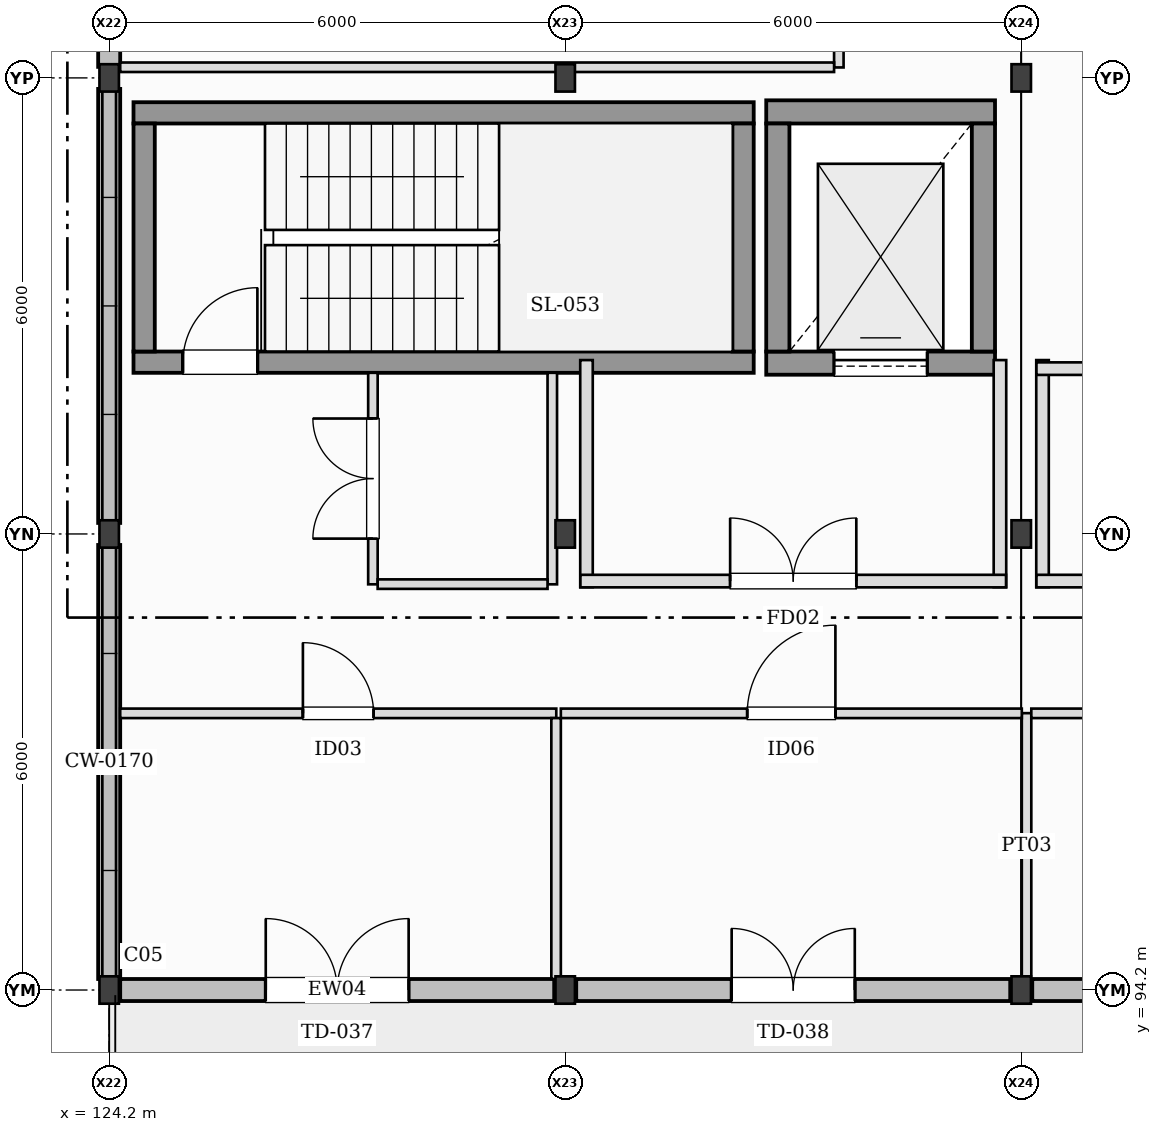
"""IFC4 building model, lengths in metres.
Left out: names, types, materials, properties, quantities, classifications, styles, units other than length and angle.
Written with IfcOpenShell. Run it as: python <this file> out.ifc"""

import sys

from ifc_helpers import new_model, si_unit, direction, frame, frame_2d, origin, origin_2d, place, context, subcontext, project, spatial, rectangle, i_section, extrude, element, fill, save


model = new_model("IFC4")
c1 = context("Model", 3, precision=1e-05, world=origin(), true_north=direction((0.0, 1.0)))
c2 = subcontext(c1, "Body", "Model", "MODEL_VIEW")
j1 = project(units=[si_unit("LENGTHUNIT", "METRE"), si_unit("PLANEANGLEUNIT", "RADIAN")], contexts=[c1])
p1 = place(None, origin())
s1 = spatial("IfcSite", under=j1, at=p1, CompositionType="ELEMENT")
p2 = place(p1, origin())
s2 = spatial("IfcBuilding", under=s1, at=p2, CompositionType="ELEMENT")
p3 = place(p2, frame((0.0, 0.0, 18.0)))
s3 = spatial("IfcBuildingStorey", under=s2, at=p3, CompositionType="ELEMENT", Elevation=18.0)
for number, where, z_axis, x_axis in (
    (1, (124.2, 94.2, 0.0), (0.0, 0.0, 1.0), (1.0, 0.0, 0.0)),
    (2, (124.2, 100.2, 0.0), (0.0, 0.0, 1.0), (1.0, 0.0, 0.0)),
    (3, (124.2, 106.2, 0.0), (0.0, 0.0, 1.0), (1.0, 0.0, 0.0)),
    (4, (130.2, 94.2, 0.0), (0.0, 0.0, 1.0), (1.0, 0.0, 0.0)),
    (5, (130.2, 100.2, 0.0), (0.0, 0.0, 1.0), (1.0, 0.0, 0.0)),
    (6, (130.2, 106.2, 0.0), (0.0, 0.0, 1.0), (1.0, 0.0, 0.0)),
    (7, (136.2, 94.2, 0.0), (0.0, 0.0, 1.0), (1.0, 0.0, 0.0)),
    (8, (136.2, 100.2, 0.0), (0.0, 0.0, 1.0), (1.0, 0.0, 0.0)),
    (9, (136.2, 106.2, 0.0), (0.0, 0.0, 1.0), (1.0, 0.0, 0.0)),
):
    element("IfcColumn", number, at=place(p3, frame(where, z_axis=z_axis, x_axis=x_axis)), inside=s3, PredefinedType="COLUMN", context=c2, shape_type="SweptSolid", body=[
        extrude(i_section(OverallWidth=0.256, OverallDepth=0.36, WebThickness=0.011, FlangeThickness=0.02, at=origin_2d()), origin(), (0.0, 0.0, 1.0), 3.6),
    ])
p4 = place(p3, frame((124.345, 94.2, 0.0), z_axis=(0.0, 0.0, 1.0), x_axis=(1.0, 0.0, 0.0)))
e10 = element("IfcWall", 10, at=p4, inside=s3, PredefinedType="STANDARD", context=c2, shape_type="SweptSolid", body=[
    extrude(rectangle(XDim=5.71, YDim=0.29, at=frame_2d((2.855, 0.0))), origin(), (0.0, 0.0, 1.0), 3.6),
])
p5 = place(p4, frame((1.915, 0.0, 0.0)))
e11 = element("IfcOpeningElement", 11, at=p5, cuts=e10, PredefinedType="OPENING", context=c2, shape_type="SweptSolid", body=[
    extrude(rectangle(XDim=1.88, YDim=2.28, at=frame_2d((0.94, 1.14))), frame((0.0, 0.155, 0.0), z_axis=(0.0, -1.0, 0.0), x_axis=(1.0, 0.0, 0.0)), (0.0, 0.0, 1.0), 0.31),
])
p6 = place(p3, frame((130.345, 94.2, 0.0), z_axis=(0.0, 0.0, 1.0), x_axis=(1.0, 0.0, 0.0)))
e12 = element("IfcWall", 12, at=p6, inside=s3, PredefinedType="STANDARD", context=c2, shape_type="SweptSolid", body=[
    extrude(rectangle(XDim=5.71, YDim=0.29, at=frame_2d((2.855, 0.0))), origin(), (0.0, 0.0, 1.0), 3.6),
])
p7 = place(p6, frame((2.045, 0.0, 0.0)))
e13 = element("IfcOpeningElement", 13, at=p7, cuts=e12, PredefinedType="OPENING", context=c2, shape_type="SweptSolid", body=[
    extrude(rectangle(XDim=1.62, YDim=2.2, at=frame_2d((0.81, 1.1))), frame((0.0, 0.155, 0.0), z_axis=(0.0, -1.0, 0.0), x_axis=(1.0, 0.0, 0.0)), (0.0, 0.0, 1.0), 0.31),
])
p8 = place(p3, frame((136.345, 94.2, 0.0), z_axis=(0.0, 0.0, 1.0), x_axis=(1.0, 0.0, 0.0)))
e14 = element("IfcWall", 14, at=p8, inside=s3, PredefinedType="STANDARD", context=c2, shape_type="SweptSolid", body=[
    extrude(rectangle(XDim=5.71, YDim=0.29, at=frame_2d((2.855, 0.0))), origin(), (0.0, 0.0, 1.0), 3.6),
])
p9 = place(p8, frame((2.335, 0.0, 0.0)))
e15 = element("IfcOpeningElement", 15, at=p9, cuts=e14, PredefinedType="OPENING", context=c2, shape_type="SweptSolid", body=[
    extrude(rectangle(XDim=1.04, YDim=2.16, at=frame_2d((0.52, 1.08))), frame((0.0, 0.155, 0.0), z_axis=(0.0, -1.0, 0.0), x_axis=(1.0, 0.0, 0.0)), (0.0, 0.0, 1.0), 0.31),
])
p10 = place(p3, frame((124.2, 100.055, 0.0), z_axis=(0.0, 0.0, 1.0), x_axis=(0.0, -1.0, 0.0)))
e16 = element("IfcWall", 16, at=p10, inside=s3, PredefinedType="STANDARD", context=c2, shape_type="SweptSolid", body=[
    extrude(rectangle(XDim=5.71, YDim=0.29, at=frame_2d((2.855, 0.0))), origin(), (0.0, 0.0, 1.0), 0.92),
])
p11 = place(p3, frame((124.2, 106.055, 0.0), z_axis=(0.0, 0.0, 1.0), x_axis=(0.0, -1.0, 0.0)))
e17 = element("IfcWall", 17, at=p11, inside=s3, PredefinedType="STANDARD", context=c2, shape_type="SweptSolid", body=[
    extrude(rectangle(XDim=5.71, YDim=0.29, at=frame_2d((2.855, 0.0))), origin(), (0.0, 0.0, 1.0), 0.32),
])
p12 = place(p3, frame((124.2, 112.055, 0.0), z_axis=(0.0, 0.0, 1.0), x_axis=(0.0, -1.0, 0.0)))
e18 = element("IfcWall", 18, at=p12, inside=s3, PredefinedType="STANDARD", context=c2, shape_type="SweptSolid", body=[
    extrude(rectangle(XDim=5.71, YDim=0.29, at=frame_2d((2.855, 0.0))), origin(), (0.0, 0.0, 1.0), 3.6),
])
p13 = place(p12, frame((1.83, 0.0, 0.85)))
e19 = element("IfcOpeningElement", 19, at=p13, cuts=e18, PredefinedType="OPENING", context=c2, shape_type="SweptSolid", body=[
    extrude(rectangle(XDim=2.05, YDim=1.75, at=frame_2d((1.025, 0.875))), frame((0.0, 0.155, 0.0), z_axis=(0.0, -1.0, 0.0), x_axis=(1.0, 0.0, 0.0)), (0.0, 0.0, 1.0), 0.31),
])
p14 = place(p3, frame((124.52, 102.46, 0.0), z_axis=(0.0, 0.0, 1.0), x_axis=(1.0, 0.0, 0.0)))
e20 = element("IfcWall", 20, at=p14, inside=s3, PredefinedType="SHEAR", context=c2, shape_type="SweptSolid", body=[
    extrude(rectangle(XDim=8.16, YDim=0.28, at=frame_2d((4.08, 0.0))), origin(), (0.0, 0.0, 1.0), 3.45),
])
p15 = place(p14, frame((0.65, 0.0, 0.0)))
e21 = element("IfcOpeningElement", 21, at=p15, cuts=e20, PredefinedType="OPENING", context=c2, shape_type="SweptSolid", body=[
    extrude(rectangle(XDim=0.98, YDim=2.15, at=frame_2d((0.49, 1.075))), frame((0.0, 0.15, 0.0), z_axis=(0.0, -1.0, 0.0), x_axis=(1.0, 0.0, 0.0)), (0.0, 0.0, 1.0), 0.3),
])
p16 = place(p3, frame((132.68, 105.74, 0.0), z_axis=(0.0, 0.0, 1.0), x_axis=(-1.0, 0.0, 0.0)))
e22 = element("IfcWall", 22, at=p16, inside=s3, PredefinedType="SHEAR", context=c2, shape_type="SweptSolid", body=[
    extrude(rectangle(XDim=8.16, YDim=0.28, at=frame_2d((4.08, 0.0))), origin(), (0.0, 0.0, 1.0), 3.45),
])
for number, where, z_axis, x_axis in (
    (23, (124.66, 105.6, 0.0), (0.0, 0.0, 1.0), (0.0, -1.0, 0.0)),
    (24, (132.54, 102.6, 0.0), (0.0, 0.0, 1.0), (0.0, 1.0, 0.0)),
):
    element("IfcWall", number, at=place(p3, frame(where, z_axis=z_axis, x_axis=x_axis)), inside=s3, PredefinedType="SHEAR", context=c2, shape_type="SweptSolid", body=[
        extrude(rectangle(XDim=3.0, YDim=0.28, at=frame_2d((1.5, 0.0))), origin(), (0.0, 0.0, 1.0), 3.45),
    ])
p17 = place(p3, frame((132.845, 102.448, 0.0), z_axis=(0.0, 0.0, 1.0), x_axis=(1.0, 0.0, 0.0)))
e25 = element("IfcWall", 25, at=p17, inside=s3, PredefinedType="SHEAR", context=c2, shape_type="SweptSolid", body=[
    extrude(rectangle(XDim=3.01, YDim=0.305, at=frame_2d((1.505, 0.0))), origin(), (0.0, 0.0, 1.0), 3.45),
])
p18 = place(p17, frame((0.895, 0.0, 0.0)))
e26 = element("IfcOpeningElement", 26, at=p18, cuts=e25, PredefinedType="OPENING", context=c2, shape_type="SweptSolid", body=[
    extrude(rectangle(XDim=1.22, YDim=2.22, at=frame_2d((0.61, 1.11))), frame((0.0, 0.162, 0.0), z_axis=(0.0, -1.0, 0.0), x_axis=(1.0, 0.0, 0.0)), (0.0, 0.0, 1.0), 0.325),
])
p19 = place(p3, frame((135.855, 105.752, 0.0), z_axis=(0.0, 0.0, 1.0), x_axis=(-1.0, 0.0, 0.0)))
e27 = element("IfcWall", 27, at=p19, inside=s3, PredefinedType="SHEAR", context=c2, shape_type="SweptSolid", body=[
    extrude(rectangle(XDim=3.01, YDim=0.305, at=frame_2d((1.505, 0.0))), origin(), (0.0, 0.0, 1.0), 3.45),
])
for number, where, z_axis, x_axis in (
    (28, (132.998, 105.6, 0.0), (0.0, 0.0, 1.0), (0.0, -1.0, 0.0)),
    (29, (135.702, 102.6, 0.0), (0.0, 0.0, 1.0), (0.0, 1.0, 0.0)),
):
    element("IfcWall", number, at=place(p3, frame(where, z_axis=z_axis, x_axis=x_axis)), inside=s3, PredefinedType="SHEAR", context=c2, shape_type="SweptSolid", body=[
        extrude(rectangle(XDim=3.0, YDim=0.305, at=frame_2d((1.5, 0.0))), origin(), (0.0, 0.0, 1.0), 3.45),
    ])
for number, where, z_axis, x_axis in (
    (30, (130.48, 99.5, 0.0), (0.0, 0.0, 1.0), (0.0, 1.0, 0.0)),
    (31, (135.92, 102.488, 0.0), (0.0, 0.0, 1.0), (0.0, -1.0, 0.0)),
):
    element("IfcWall", number, at=place(p3, frame(where, z_axis=z_axis, x_axis=x_axis)), inside=s3, PredefinedType="PARTITIONING", context=c2, shape_type="SweptSolid", body=[
        extrude(rectangle(XDim=2.988, YDim=0.165, at=frame_2d((1.494, 0.0))), origin(), (0.0, 0.0, 1.0), 3.36),
    ])
p20 = place(p3, frame((130.4, 99.58, 0.0), z_axis=(0.0, 0.0, 1.0), x_axis=(1.0, 0.0, 0.0)))
e32 = element("IfcWall", 32, at=p20, inside=s3, PredefinedType="PARTITIONING", context=c2, shape_type="SweptSolid", body=[
    extrude(rectangle(XDim=5.6, YDim=0.165, at=frame_2d((2.8, 0.0))), origin(), (0.0, 0.0, 1.0), 3.36),
])
p21 = place(p20, frame((1.97, 0.0, 0.0)))
e33 = element("IfcOpeningElement", 33, at=p21, cuts=e32, PredefinedType="OPENING", context=c2, shape_type="SweptSolid", body=[
    extrude(rectangle(XDim=1.66, YDim=2.2, at=frame_2d((0.83, 1.1))), frame((0.0, 0.093, 0.0), z_axis=(0.0, -1.0, 0.0), x_axis=(1.0, 0.0, 0.0)), (0.0, 0.0, 1.0), 0.185),
])
p22 = place(p3, frame((136.48, 99.5, 0.0), z_axis=(0.0, 0.0, 1.0), x_axis=(0.0, 1.0, 0.0)))
e34 = element("IfcWall", 34, at=p22, inside=s3, PredefinedType="PARTITIONING", context=c2, shape_type="SweptSolid", body=[
    extrude(rectangle(XDim=2.988, YDim=0.165, at=frame_2d((1.494, 0.0))), origin(), (0.0, 0.0, 1.0), 3.36),
])
p23 = place(p3, frame((136.4, 102.375, 0.0), z_axis=(0.0, 0.0, 1.0), x_axis=(1.0, 0.0, 0.0)))
e35 = element("IfcWall", 35, at=p23, inside=s3, PredefinedType="PARTITIONING", context=c2, shape_type="SweptSolid", body=[
    extrude(rectangle(XDim=1.365, YDim=0.165, at=frame_2d((0.683, 0.0))), origin(), (0.0, 0.0, 1.0), 3.36),
])
p24 = place(p3, frame((136.4, 99.58, 0.0), z_axis=(0.0, 0.0, 1.0), x_axis=(1.0, 0.0, 0.0)))
e36 = element("IfcWall", 36, at=p24, inside=s3, PredefinedType="PARTITIONING", context=c2, shape_type="SweptSolid", body=[
    extrude(rectangle(XDim=5.6, YDim=0.165, at=frame_2d((2.8, 0.0))), origin(), (0.0, 0.0, 1.0), 3.36),
])
p25 = place(p24, frame((1.97, 0.0, 0.0)))
e37 = element("IfcOpeningElement", 37, at=p25, cuts=e36, PredefinedType="OPENING", context=c2, shape_type="SweptSolid", body=[
    extrude(rectangle(XDim=1.66, YDim=2.2, at=frame_2d((0.83, 1.1))), frame((0.0, 0.093, 0.0), z_axis=(0.0, -1.0, 0.0), x_axis=(1.0, 0.0, 0.0)), (0.0, 0.0, 1.0), 0.185),
])
p26 = place(p3, frame((136.27, 94.345, 0.0), z_axis=(0.0, 0.0, 1.0), x_axis=(0.0, 1.0, 0.0)))
e38 = element("IfcWall", 38, at=p26, inside=s3, PredefinedType="PARTITIONING", context=c2, shape_type="SweptSolid", body=[
    extrude(rectangle(XDim=3.498, YDim=0.125, at=frame_2d((1.749, 0.0))), origin(), (0.0, 0.0, 1.0), 3.36),
])
p27 = place(p3, frame((136.333, 97.84, 0.0), z_axis=(0.0, 0.0, 1.0), x_axis=(1.0, 0.0, 0.0)))
e39 = element("IfcWall", 39, at=p27, inside=s3, PredefinedType="PARTITIONING", context=c2, shape_type="SweptSolid", body=[
    extrude(rectangle(XDim=17.722, YDim=0.125, at=frame_2d((8.861, 0.0))), origin(), (0.0, 0.0, 1.0), 3.36),
])
p28 = place(p27, frame((8.381, 0.0, 0.0)))
e40 = element("IfcOpeningElement", 40, at=p28, cuts=e39, PredefinedType="OPENING", context=c2, shape_type="SweptSolid", body=[
    extrude(rectangle(XDim=0.96, YDim=2.15, at=frame_2d((0.48, 1.075))), frame((0.0, 0.073, 0.0), z_axis=(0.0, -1.0, 0.0), x_axis=(1.0, 0.0, 0.0)), (0.0, 0.0, 1.0), 0.145),
])
p29 = place(p3, frame((124.345, 97.84, 0.0), z_axis=(0.0, 0.0, 1.0), x_axis=(1.0, 0.0, 0.0)))
e41 = element("IfcWall", 41, at=p29, inside=s3, PredefinedType="PARTITIONING", context=c2, shape_type="SweptSolid", body=[
    extrude(rectangle(XDim=5.738, YDim=0.125, at=frame_2d((2.869, 0.0))), origin(), (0.0, 0.0, 1.0), 3.36),
])
p30 = place(p29, frame((2.404, 0.0, 0.0)))
e42 = element("IfcOpeningElement", 42, at=p30, cuts=e41, PredefinedType="OPENING", context=c2, shape_type="SweptSolid", body=[
    extrude(rectangle(XDim=0.93, YDim=2.1, at=frame_2d((0.465, 1.05))), frame((0.0, 0.073, 0.0), z_axis=(0.0, -1.0, 0.0), x_axis=(1.0, 0.0, 0.0)), (0.0, 0.0, 1.0), 0.145),
])
p31 = place(p3, frame((130.08, 97.778, 0.0), z_axis=(0.0, 0.0, 1.0), x_axis=(0.0, -1.0, 0.0)))
e43 = element("IfcWall", 43, at=p31, inside=s3, PredefinedType="PARTITIONING", context=c2, shape_type="SweptSolid", body=[
    extrude(rectangle(XDim=3.433, YDim=0.125, at=frame_2d((1.716, 0.0))), origin(), (0.0, 0.0, 1.0), 3.36),
])
p32 = place(p3, frame((130.143, 97.84, 0.0), z_axis=(0.0, 0.0, 1.0), x_axis=(1.0, 0.0, 0.0)))
e44 = element("IfcWall", 44, at=p32, inside=s3, PredefinedType="PARTITIONING", context=c2, shape_type="SweptSolid", body=[
    extrude(rectangle(XDim=6.065, YDim=0.125, at=frame_2d((3.032, 0.0))), origin(), (0.0, 0.0, 1.0), 3.36),
])
p33 = place(p32, frame((2.452, 0.0, 0.0)))
e45 = element("IfcOpeningElement", 45, at=p33, cuts=e44, PredefinedType="OPENING", context=c2, shape_type="SweptSolid", body=[
    extrude(rectangle(XDim=1.16, YDim=2.2, at=frame_2d((0.58, 1.1))), frame((0.0, 0.073, 0.0), z_axis=(0.0, -1.0, 0.0), x_axis=(1.0, 0.0, 0.0)), (0.0, 0.0, 1.0), 0.145),
])
p34 = place(p3, frame((133.8, 108.403, 0.0), z_axis=(0.0, 0.0, 1.0), x_axis=(0.0, -1.0, 0.0)))
e46 = element("IfcWall", 46, at=p34, inside=s3, PredefinedType="PARTITIONING", context=c2, shape_type="SweptSolid", body=[
    extrude(rectangle(XDim=2.065, YDim=0.125, at=frame_2d((1.033, 0.0))), origin(), (0.0, 0.0, 1.0), 3.36),
])
p35 = place(p3, frame((133.738, 106.34, 0.0), z_axis=(0.0, 0.0, 1.0), x_axis=(-1.0, 0.0, 0.0)))
e47 = element("IfcWall", 47, at=p35, inside=s3, PredefinedType="PARTITIONING", context=c2, shape_type="SweptSolid", body=[
    extrude(rectangle(XDim=9.393, YDim=0.125, at=frame_2d((4.696, 0.0))), origin(), (0.0, 0.0, 1.0), 3.36),
])
p36 = place(p3, frame((127.67, 99.538, 0.0), z_axis=(0.0, 0.0, 1.0), x_axis=(0.0, 1.0, 0.0)))
e48 = element("IfcWall", 48, at=p36, inside=s3, PredefinedType="PARTITIONING", context=c2, shape_type="SweptSolid", body=[
    extrude(rectangle(XDim=2.782, YDim=0.125, at=frame_2d((1.391, 0.0))), origin(), (0.0, 0.0, 1.0), 3.36),
])
p37 = place(p36, frame((0.601, 0.0, 0.0)))
e49 = element("IfcOpeningElement", 49, at=p37, cuts=e48, PredefinedType="OPENING", context=c2, shape_type="SweptSolid", body=[
    extrude(rectangle(XDim=1.58, YDim=2.2, at=frame_2d((0.79, 1.1))), frame((0.0, 0.073, 0.0), z_axis=(0.0, -1.0, 0.0), x_axis=(1.0, 0.0, 0.0)), (0.0, 0.0, 1.0), 0.145),
])
p38 = place(p3, frame((130.03, 102.32, 0.0), z_axis=(0.0, 0.0, 1.0), x_axis=(0.0, -1.0, 0.0)))
e50 = element("IfcWall", 50, at=p38, inside=s3, PredefinedType="PARTITIONING", context=c2, shape_type="SweptSolid", body=[
    extrude(rectangle(XDim=2.782, YDim=0.125, at=frame_2d((1.391, 0.0))), origin(), (0.0, 0.0, 1.0), 3.36),
])
p39 = place(p3, frame((129.968, 99.54, 0.0), z_axis=(0.0, 0.0, 1.0), x_axis=(-1.0, 0.0, 0.0)))
e51 = element("IfcWall", 51, at=p39, inside=s3, PredefinedType="PARTITIONING", context=c2, shape_type="SweptSolid", body=[
    extrude(rectangle(XDim=2.235, YDim=0.125, at=frame_2d((1.118, 0.0))), origin(), (0.0, 0.0, 1.0), 3.36),
])
p40 = place(p5, frame((1.88, 0.0, 0.0), z_axis=(0.0, 0.0, 1.0), x_axis=(-1.0, 0.0, 0.0)))
e52 = element("IfcDoor", 52, at=p40, inside=s3, OperationType="DOUBLE_DOOR_SINGLE_SWING", PredefinedType="DOOR", context=c2, shape_type="SweptSolid", body=[
    extrude(rectangle(XDim=1.88, YDim=2.28, at=frame_2d((0.94, 1.14))), frame((0.0, 0.025, 0.0), z_axis=(0.0, -1.0, 0.0), x_axis=(1.0, 0.0, 0.0)), (0.0, 0.0, 1.0), 0.05),
])
fill(e11, e52)
p41 = place(p7, frame((1.62, 0.0, 0.0), z_axis=(0.0, 0.0, 1.0), x_axis=(-1.0, 0.0, 0.0)))
e53 = element("IfcDoor", 53, at=p41, inside=s3, OperationType="DOUBLE_DOOR_SINGLE_SWING", PredefinedType="DOOR", context=c2, shape_type="SweptSolid", body=[
    extrude(rectangle(XDim=1.62, YDim=2.2, at=frame_2d((0.81, 1.1))), frame((0.0, 0.025, 0.0), z_axis=(0.0, -1.0, 0.0), x_axis=(1.0, 0.0, 0.0)), (0.0, 0.0, 1.0), 0.05),
])
fill(e13, e53)
p42 = place(p15, origin())
e54 = element("IfcDoor", 54, at=p42, inside=s3, OperationType="SINGLE_SWING_RIGHT", PredefinedType="DOOR", context=c2, shape_type="SweptSolid", body=[
    extrude(rectangle(XDim=0.98, YDim=2.15, at=frame_2d((0.49, 1.075))), frame((0.0, 0.025, 0.0), z_axis=(0.0, -1.0, 0.0), x_axis=(1.0, 0.0, 0.0)), (0.0, 0.0, 1.0), 0.05),
])
fill(e21, e54)
p43 = place(p18, origin())
e55 = element("IfcDoor", 55, at=p43, inside=s3, OperationType="SLIDING_TO_LEFT", PredefinedType="DOOR", context=c2, shape_type="SweptSolid", body=[
    extrude(rectangle(XDim=1.22, YDim=2.22, at=frame_2d((0.61, 1.11))), frame((0.0, 0.025, 0.0), z_axis=(0.0, -1.0, 0.0), x_axis=(1.0, 0.0, 0.0)), (0.0, 0.0, 1.0), 0.05),
])
fill(e26, e55)
p44 = place(p21, frame((1.66, 0.0, 0.0), z_axis=(0.0, 0.0, 1.0), x_axis=(-1.0, 0.0, 0.0)))
e56 = element("IfcDoor", 56, at=p44, inside=s3, OperationType="DOUBLE_DOOR_SINGLE_SWING", PredefinedType="DOOR", context=c2, shape_type="SweptSolid", body=[
    extrude(rectangle(XDim=1.66, YDim=2.2, at=frame_2d((0.83, 1.1))), frame((0.0, 0.025, 0.0), z_axis=(0.0, -1.0, 0.0), x_axis=(1.0, 0.0, 0.0)), (0.0, 0.0, 1.0), 0.05),
])
fill(e33, e56)
p45 = place(p30, frame((0.93, 0.0, 0.0), z_axis=(0.0, 0.0, 1.0), x_axis=(-1.0, 0.0, 0.0)))
e57 = element("IfcDoor", 57, at=p45, inside=s3, OperationType="SINGLE_SWING_LEFT", PredefinedType="DOOR", context=c2, shape_type="SweptSolid", body=[
    extrude(rectangle(XDim=0.93, YDim=2.1, at=frame_2d((0.465, 1.05))), frame((0.0, 0.025, 0.0), z_axis=(0.0, -1.0, 0.0), x_axis=(1.0, 0.0, 0.0)), (0.0, 0.0, 1.0), 0.05),
])
fill(e42, e57)
p46 = place(p33, frame((1.16, 0.0, 0.0), z_axis=(0.0, 0.0, 1.0), x_axis=(-1.0, 0.0, 0.0)))
e58 = element("IfcDoor", 58, at=p46, inside=s3, OperationType="SINGLE_SWING_RIGHT", PredefinedType="DOOR", context=c2, shape_type="SweptSolid", body=[
    extrude(rectangle(XDim=1.16, YDim=2.2, at=frame_2d((0.58, 1.1))), frame((0.0, 0.025, 0.0), z_axis=(0.0, -1.0, 0.0), x_axis=(1.0, 0.0, 0.0)), (0.0, 0.0, 1.0), 0.05),
])
fill(e45, e58)
p47 = place(p37, frame((1.58, 0.0, 0.0), z_axis=(0.0, 0.0, 1.0), x_axis=(-1.0, 0.0, 0.0)))
e59 = element("IfcDoor", 59, at=p47, inside=s3, OperationType="DOUBLE_DOOR_SINGLE_SWING", PredefinedType="DOOR", context=c2, shape_type="SweptSolid", body=[
    extrude(rectangle(XDim=1.58, YDim=2.2, at=frame_2d((0.79, 1.1))), frame((0.0, 0.025, 0.0), z_axis=(0.0, -1.0, 0.0), x_axis=(1.0, 0.0, 0.0)), (0.0, 0.0, 1.0), 0.05),
])
fill(e49, e59)
save(model, sys.argv[1])
